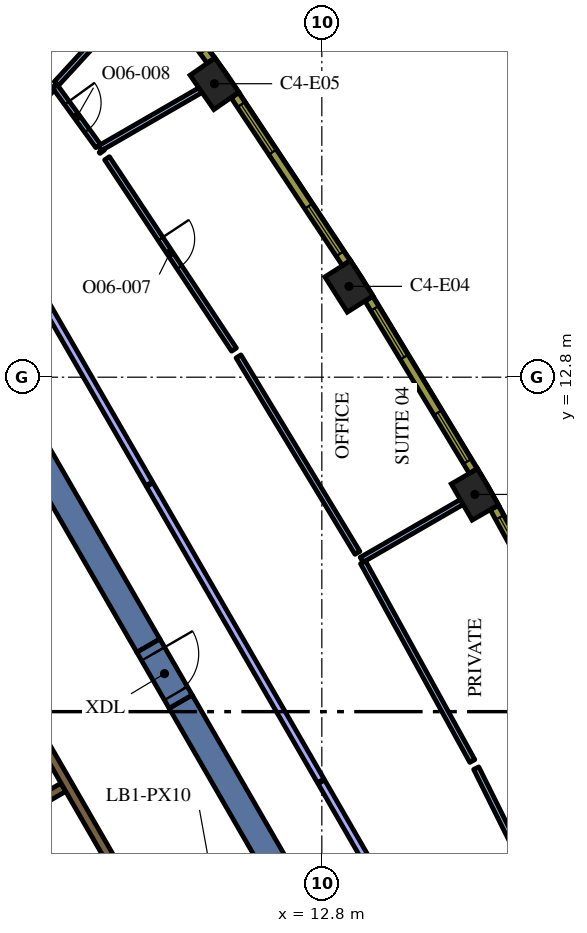
"""IFC4 building model, lengths in metres.
Left out: names, types, materials, properties, quantities, classifications, styles, units other than length and angle.
Written with IfcOpenShell. Run it as: python <this file> out.ifc"""

import sys

from ifc_helpers import new_model, si_unit, direction, frame, frame_2d, origin, origin_2d, place, context, subcontext, project, spatial, rectangle, extrude, element, fill, save


model = new_model("IFC4")
c1 = context("Model", 3, precision=1e-05, world=origin(), true_north=direction((0.0, 1.0)))
c2 = subcontext(c1, "Body", "Model", "MODEL_VIEW")
j1 = project(units=[si_unit("LENGTHUNIT", "METRE"), si_unit("PLANEANGLEUNIT", "RADIAN")], contexts=[c1])
p1 = place(None, origin())
s1 = spatial("IfcSite", under=j1, at=p1, CompositionType="ELEMENT")
p2 = place(p1, origin())
s2 = spatial("IfcBuilding", under=s1, at=p2, CompositionType="ELEMENT")
p3 = place(p2, frame((0.0, 0.0, 201.6)))
s3 = spatial("IfcBuildingStorey", under=s2, at=p3, CompositionType="ELEMENT", Elevation=201.6)
for number, where, z_axis, x_axis in (
    (1, (16.827, 9.715, 0.0), (0.0, 0.0, 1.0), (-0.5, 0.866, 0.0)),
    (2, (13.513, 15.19, 0.0), (0.0, 0.0, 1.0), (-0.536, 0.845, 0.0)),
    (3, (9.975, 20.522, 0.0), (0.0, 0.0, 1.0), (-0.57, 0.822, 0.0)),
):
    element("IfcColumn", number, at=place(p3, frame(where, z_axis=z_axis, x_axis=x_axis)), inside=s3, PredefinedType="COLUMN", context=c2, shape_type="SweptSolid", body=[
        extrude(rectangle(XDim=1.1, YDim=0.8, at=origin_2d()), origin(), (0.0, 0.0, 1.0), 4.2),
    ])
for number, where, z_axis, x_axis in (
    (4, (9.085, 4.264, 0.0), (0.0, 0.0, 1.0), (0.5, -0.866, 0.0)),
    (5, (8.235, 5.736, 0.0), (0.0, 0.0, 1.0), (-0.5, 0.866, 0.0)),
):
    element("IfcWall", number, at=place(p3, frame(where, z_axis=z_axis, x_axis=x_axis)), inside=s3, PredefinedType="SOLIDWALL", context=c2, shape_type="SweptSolid", body=[
        extrude(rectangle(XDim=12.472, YDim=0.7, at=frame_2d((6.236, 0.0))), origin(), (0.0, 0.0, 1.0), 4.2),
    ])
p4 = place(p3, frame((5.97, -2.591, 0.0), z_axis=(0.0, 0.0, 1.0), x_axis=(-0.499994469932, 0.866028596547, 0.0)))
e6 = element("IfcWall", 6, at=p4, inside=s3, PredefinedType="SOLIDWALL", context=c2, shape_type="SweptSolid", body=[
    extrude(rectangle(XDim=10.488, YDim=0.25, at=frame_2d((5.244, 0.0))), origin(), (0.0, 0.0, 1.0), 4.2),
])
p5 = place(p3, frame((4.094, 0.909, 0.0), z_axis=(0.0, 0.0, 1.0), x_axis=(0.866008176907, 0.50002983664, 0.0)))
e7 = element("IfcWall", 7, at=p5, inside=s3, PredefinedType="SOLIDWALL", context=c2, shape_type="SweptSolid", body=[
    extrude(rectangle(XDim=2.2, YDim=0.25, at=frame_2d((1.1, 0.0))), origin(), (0.0, 0.0, 1.0), 4.2),
])
p6 = place(p3, frame((8.565, -2.185, 0.0), z_axis=(0.0, 0.0, 1.0), x_axis=(-0.499997954832, 0.866026584559, 0.0)))
e8 = element("IfcWall", 8, at=p6, inside=s3, PredefinedType="SOLIDWALL", context=c2, shape_type="SweptSolid", body=[
    extrude(rectangle(XDim=12.35, YDim=0.25, at=frame_2d((6.175, 0.0))), origin(), (0.0, 0.0, 1.0), 4.2),
])
p7 = place(p6, frame((0.585, 0.0, 0.0)))
e9 = element("IfcOpeningElement", 9, at=p7, cuts=e8, PredefinedType="OPENING", context=c2, shape_type="SweptSolid", body=[
    extrude(rectangle(XDim=1.1, YDim=2.1, at=frame_2d((0.55, 1.05))), frame((0.0, 0.135, 0.0), z_axis=(0.0, -1.0, 0.0), x_axis=(1.0, 0.0, 0.0)), (0.0, 0.0, 1.0), 0.27),
])
p8 = place(p3, frame((8.235, 5.736, 0.0), z_axis=(0.0, 0.0, 1.0), x_axis=(0.499954529098, -0.86605165483, 0.0)))
e10 = element("IfcWall", 10, at=p8, inside=s3, PredefinedType="SOLIDWALL", context=c2, shape_type="SweptSolid", body=[
    extrude(rectangle(XDim=1.7, YDim=0.7, at=frame_2d((0.85, 0.0))), origin(), (0.0, 0.0, 1.0), 4.2),
])
p9 = place(p8, frame((0.25, 0.0, 0.0)))
e11 = element("IfcOpeningElement", 11, at=p9, cuts=e10, PredefinedType="OPENING", context=c2, shape_type="SweptSolid", body=[
    extrude(rectangle(XDim=1.2, YDim=2.1, at=frame_2d((0.6, 1.05))), frame((0.0, 0.36, 0.0), z_axis=(0.0, -1.0, 0.0), x_axis=(1.0, 0.0, 0.0)), (0.0, 0.0, 1.0), 0.72),
])
p10 = place(p3, frame((13.848, 7.995, 0.0), z_axis=(0.0, 0.0, 1.0), x_axis=(0.86603583403, 0.49998193385, 0.0)))
e12 = element("IfcWall", 12, at=p10, inside=s3, PredefinedType="PARTITIONING", context=c2, shape_type="SweptSolid", body=[
    extrude(rectangle(XDim=3.041, YDim=0.15, at=frame_2d((1.52, 0.0))), origin(), (0.0, 0.0, 1.0), 3.45),
])
p11 = place(p3, frame((16.863, 2.513, 0.0), z_axis=(0.0, 0.0, 1.0), x_axis=(0.445159947046, -0.895451071553, 0.0)))
e13 = element("IfcWall", 13, at=p11, inside=s3, PredefinedType="PARTITIONING", context=c2, shape_type="SweptSolid", body=[
    extrude(rectangle(XDim=6.043, YDim=0.15, at=frame_2d((3.021, 0.0))), origin(), (0.0, 0.0, 1.0), 3.45),
])
p12 = place(p11, frame((2.542, 0.0, 0.0)))
e14 = element("IfcOpeningElement", 14, at=p12, cuts=e13, PredefinedType="OPENING", context=c2, shape_type="SweptSolid", body=[
    extrude(rectangle(XDim=0.9, YDim=2.1, at=frame_2d((0.45, 1.05))), frame((0.0, 0.085, 0.0), z_axis=(0.0, -1.0, 0.0), x_axis=(1.0, 0.0, 0.0)), (0.0, 0.0, 1.0), 0.17),
])
p13 = place(p3, frame((16.76, 2.7, 0.0), z_axis=(0.0, 0.0, 1.0), x_axis=(-0.481907755985, 0.876221955169, 0.0)))
e15 = element("IfcWall", 15, at=p13, inside=s3, PredefinedType="PARTITIONING", context=c2, shape_type="SweptSolid", body=[
    extrude(rectangle(XDim=5.967, YDim=0.15, at=frame_2d((2.984, 0.0))), origin(), (0.0, 0.0, 1.0), 3.45),
])
p14 = place(p3, frame((6.958, 18.823, 0.0), z_axis=(0.0, 0.0, 1.0), x_axis=(0.866008752819, 0.500028839209, 0.0)))
e16 = element("IfcWall", 16, at=p14, inside=s3, PredefinedType="PARTITIONING", context=c2, shape_type="SweptSolid", body=[
    extrude(rectangle(XDim=3.058, YDim=0.15, at=frame_2d((1.529, 0.0))), origin(), (0.0, 0.0, 1.0), 3.45),
])
p15 = place(p3, frame((13.737, 8.178, 0.0), z_axis=(0.0, 0.0, 1.0), x_axis=(-0.517884383874, 0.855450620983, 0.0)))
e17 = element("IfcWall", 17, at=p15, inside=s3, PredefinedType="PARTITIONING", context=c2, shape_type="SweptSolid", body=[
    extrude(rectangle(XDim=6.043, YDim=0.15, at=frame_2d((3.021, 0.0))), origin(), (0.0, 0.0, 1.0), 3.45),
])
p16 = place(p3, frame((7.148, 18.561, 0.0), z_axis=(0.0, 0.0, 1.0), x_axis=(0.552890023891, -0.833254235802, 0.0)))
e18 = element("IfcWall", 18, at=p16, inside=s3, PredefinedType="PARTITIONING", context=c2, shape_type="SweptSolid", body=[
    extrude(rectangle(XDim=6.042, YDim=0.15, at=frame_2d((3.021, 0.0))), origin(), (0.0, 0.0, 1.0), 3.45),
])
p17 = place(p16, frame((2.542, 0.0, 0.0)))
e19 = element("IfcOpeningElement", 19, at=p17, cuts=e18, PredefinedType="OPENING", context=c2, shape_type="SweptSolid", body=[
    extrude(rectangle(XDim=0.9, YDim=2.1, at=frame_2d((0.45, 1.05))), frame((0.0, 0.085, 0.0), z_axis=(0.0, -1.0, 0.0), x_axis=(1.0, 0.0, 0.0)), (0.0, 0.0, 1.0), 0.17),
])
p18 = place(p3, frame((7.022, 18.734, 0.0), z_axis=(0.0, 0.0, 1.0), x_axis=(-0.585233084123, 0.810865116556, 0.0)))
e20 = element("IfcWall", 20, at=p18, inside=s3, PredefinedType="PARTITIONING", context=c2, shape_type="SweptSolid", body=[
    extrude(rectangle(XDim=0.035, YDim=0.15, at=frame_2d((0.017, 0.0))), origin(), (0.0, 0.0, 1.0), 3.45),
])
p19 = place(p3, frame((5.764, 20.469, 0.0), z_axis=(0.0, 0.0, 1.0), x_axis=(0.586969615341, -0.809608961577, 0.0)))
e21 = element("IfcWall", 21, at=p19, inside=s3, PredefinedType="PARTITIONING", context=c2, shape_type="SweptSolid", body=[
    extrude(rectangle(XDim=1.957, YDim=0.15, at=frame_2d((0.979, 0.0))), origin(), (0.0, 0.0, 1.0), 3.45),
])
p20 = place(p19, frame((0.558, 0.0, 0.0)))
e22 = element("IfcOpeningElement", 22, at=p20, cuts=e21, PredefinedType="OPENING", context=c2, shape_type="SweptSolid", body=[
    extrude(rectangle(XDim=0.9, YDim=2.1, at=frame_2d((0.45, 1.05))), frame((0.0, 0.085, 0.0), z_axis=(0.0, -1.0, 0.0), x_axis=(1.0, 0.0, 0.0)), (0.0, 0.0, 1.0), 0.17),
])
p21 = place(p3, frame((5.816, 20.526, 0.0), z_axis=(0.0, 0.0, 1.0), x_axis=(0.675700046709, 0.737176672771, 0.0)))
e23 = element("IfcWall", 23, at=p21, inside=s3, PredefinedType="PARTITIONING", context=c2, shape_type="SweptSolid", body=[
    extrude(rectangle(XDim=3.598, YDim=0.15, at=frame_2d((1.799, 0.0))), origin(), (0.0, 0.0, 1.0), 3.45),
])
p22 = place(p3, frame((3.585, 18.091, 0.0), z_axis=(0.0, 0.0, 1.0), x_axis=(0.675657922277, 0.737215282034, 0.0)))
e24 = element("IfcWall", 24, at=p22, inside=s3, PredefinedType="PARTITIONING", context=c2, shape_type="SweptSolid", body=[
    extrude(rectangle(XDim=3.149, YDim=0.15, at=frame_2d((1.575, 0.0))), origin(), (0.0, 0.0, 1.0), 3.45),
])
p23 = place(p22, frame((1.0, 0.0, 0.0)))
e25 = element("IfcOpeningElement", 25, at=p23, cuts=e24, PredefinedType="OPENING", context=c2, shape_type="SweptSolid", body=[
    extrude(rectangle(XDim=0.9, YDim=2.1, at=frame_2d((0.45, 1.05))), frame((0.0, 0.085, 0.0), z_axis=(0.0, -1.0, 0.0), x_axis=(1.0, 0.0, 0.0)), (0.0, 0.0, 1.0), 0.17),
])
p24 = place(p3, frame((12.772, 2.178, 0.0), z_axis=(0.0, 0.0, 1.0), x_axis=(-0.5000018851, 0.866024315419, 0.0)))
e26 = element("IfcWall", 26, at=p24, inside=s3, PredefinedType="PARTITIONING", context=c2, shape_type="SweptSolid", body=[
    extrude(rectangle(XDim=9.0, YDim=0.2, at=frame_2d((4.5, 0.0))), origin(), (0.0, 0.0, 1.0), 3.45),
])
p25 = place(p3, frame((8.257, 9.998, 0.0), z_axis=(0.0, 0.0, 1.0), x_axis=(-0.499998405424, 0.866026324412, 0.0)))
e27 = element("IfcWall", 27, at=p25, inside=s3, PredefinedType="PARTITIONING", context=c2, shape_type="SweptSolid", body=[
    extrude(rectangle(XDim=9.267, YDim=0.2, at=frame_2d((4.633, 0.0))), origin(), (0.0, 0.0, 1.0), 3.45),
])
p26 = place(p3, frame((17.681, -6.324, 0.0), z_axis=(0.0, 0.0, 1.0), x_axis=(-0.500021153861, 0.866013190252, 0.0)))
e28 = element("IfcWall", 28, at=p26, inside=s3, PredefinedType="PARTITIONING", context=c2, shape_type="SweptSolid", body=[
    extrude(rectangle(XDim=9.787, YDim=0.2, at=frame_2d((4.894, 0.0))), origin(), (0.0, 0.0, 1.0), 3.45),
])
p27 = place(p26, frame((4.4, 0.0, 0.0)))
e29 = element("IfcOpeningElement", 29, at=p27, cuts=e28, PredefinedType="OPENING", context=c2, shape_type="SweptSolid", body=[
    extrude(rectangle(XDim=1.0, YDim=2.1, at=frame_2d((0.5, 1.05))), frame((0.0, 0.11, 0.0), z_axis=(0.0, -1.0, 0.0), x_axis=(1.0, 0.0, 0.0)), (0.0, 0.0, 1.0), 0.22),
])
p28 = place(p3, frame((19.892, 4.725, 0.0), z_axis=(0.0, 0.0, 1.0), x_axis=(-0.481925825015, 0.876212017256, 0.0)))
e30 = element("IfcWall", 30, at=p28, inside=s3, PredefinedType="SOLIDWALL", context=c2, shape_type="SweptSolid", body=[
    extrude(rectangle(XDim=5.299, YDim=0.24, at=frame_2d((2.649, 0.0))), origin(), (0.0, 0.0, 1.0), 3.95),
])
p29 = place(p28, frame((0.295, 0.0, 0.9)))
e31 = element("IfcOpeningElement", 31, at=p29, cuts=e30, PredefinedType="OPENING", context=c2, shape_type="SweptSolid", body=[
    extrude(rectangle(XDim=1.5, YDim=2.55, at=frame_2d((0.75, 1.275))), frame((0.0, 0.13, 0.0), z_axis=(0.0, -1.0, 0.0), x_axis=(1.0, 0.0, 0.0)), (0.0, 0.0, 1.0), 0.26),
])
p30 = place(p28, frame((3.504, 0.0, 0.9)))
e32 = element("IfcOpeningElement", 32, at=p30, cuts=e30, PredefinedType="OPENING", context=c2, shape_type="SweptSolid", body=[
    extrude(rectangle(XDim=1.5, YDim=2.55, at=frame_2d((0.75, 1.275))), frame((0.0, 0.13, 0.0), z_axis=(0.0, -1.0, 0.0), x_axis=(1.0, 0.0, 0.0)), (0.0, 0.0, 1.0), 0.26),
])
p31 = place(p3, frame((16.782, 10.331, 0.0), z_axis=(0.0, 0.0, 1.0), x_axis=(-0.517846166225, 0.855473756538, 0.0)))
e33 = element("IfcWall", 33, at=p31, inside=s3, PredefinedType="SOLIDWALL", context=c2, shape_type="SweptSolid", body=[
    extrude(rectangle(XDim=5.298, YDim=0.24, at=frame_2d((2.649, 0.0))), origin(), (0.0, 0.0, 1.0), 3.95),
])
p32 = place(p31, frame((0.294, 0.0, 0.9)))
e34 = element("IfcOpeningElement", 34, at=p32, cuts=e33, PredefinedType="OPENING", context=c2, shape_type="SweptSolid", body=[
    extrude(rectangle(XDim=1.5, YDim=2.55, at=frame_2d((0.75, 1.275))), frame((0.0, 0.13, 0.0), z_axis=(0.0, -1.0, 0.0), x_axis=(1.0, 0.0, 0.0)), (0.0, 0.0, 1.0), 0.26),
])
p33 = place(p31, frame((3.504, 0.0, 0.9)))
e35 = element("IfcOpeningElement", 35, at=p33, cuts=e33, PredefinedType="OPENING", context=c2, shape_type="SweptSolid", body=[
    extrude(rectangle(XDim=1.5, YDim=2.55, at=frame_2d((0.75, 1.275))), frame((0.0, 0.13, 0.0), z_axis=(0.0, -1.0, 0.0), x_axis=(1.0, 0.0, 0.0)), (0.0, 0.0, 1.0), 0.26),
])
p34 = place(p3, frame((13.442, 15.803, 0.0), z_axis=(0.0, 0.0, 1.0), x_axis=(-0.552901821755, 0.833246407433, 0.0)))
e36 = element("IfcWall", 36, at=p34, inside=s3, PredefinedType="SOLIDWALL", context=c2, shape_type="SweptSolid", body=[
    extrude(rectangle(XDim=5.298, YDim=0.24, at=frame_2d((2.649, 0.0))), origin(), (0.0, 0.0, 1.0), 3.95),
])
p35 = place(p34, frame((0.295, 0.0, 0.9)))
e37 = element("IfcOpeningElement", 37, at=p35, cuts=e36, PredefinedType="OPENING", context=c2, shape_type="SweptSolid", body=[
    extrude(rectangle(XDim=1.5, YDim=2.55, at=frame_2d((0.75, 1.275))), frame((0.0, 0.13, 0.0), z_axis=(0.0, -1.0, 0.0), x_axis=(1.0, 0.0, 0.0)), (0.0, 0.0, 1.0), 0.26),
])
p36 = place(p34, frame((3.504, 0.0, 0.9)))
e38 = element("IfcOpeningElement", 38, at=p36, cuts=e36, PredefinedType="OPENING", context=c2, shape_type="SweptSolid", body=[
    extrude(rectangle(XDim=1.5, YDim=2.55, at=frame_2d((0.75, 1.275))), frame((0.0, 0.13, 0.0), z_axis=(0.0, -1.0, 0.0), x_axis=(1.0, 0.0, 0.0)), (0.0, 0.0, 1.0), 0.26),
])
p37 = place(p3, frame((9.878, 21.132, 0.0), z_axis=(0.0, 0.0, 1.0), x_axis=(-0.586998456641, 0.80958805074, 0.0)))
e39 = element("IfcWall", 39, at=p37, inside=s3, PredefinedType="SOLIDWALL", context=c2, shape_type="SweptSolid", body=[
    extrude(rectangle(XDim=5.311, YDim=0.24, at=frame_2d((2.655, 0.0))), origin(), (0.0, 0.0, 1.0), 3.95),
])
p38 = place(p37, frame((0.306, 0.0, 0.9)))
e40 = element("IfcOpeningElement", 40, at=p38, cuts=e39, PredefinedType="OPENING", context=c2, shape_type="SweptSolid", body=[
    extrude(rectangle(XDim=1.5, YDim=2.55, at=frame_2d((0.75, 1.275))), frame((0.0, 0.13, 0.0), z_axis=(0.0, -1.0, 0.0), x_axis=(1.0, 0.0, 0.0)), (0.0, 0.0, 1.0), 0.26),
])
p39 = place(p37, frame((3.539, 0.0, 0.9)))
e41 = element("IfcOpeningElement", 41, at=p39, cuts=e39, PredefinedType="OPENING", context=c2, shape_type="SweptSolid", body=[
    extrude(rectangle(XDim=1.5, YDim=2.55, at=frame_2d((0.75, 1.275))), frame((0.0, 0.13, 0.0), z_axis=(0.0, -1.0, 0.0), x_axis=(1.0, 0.0, 0.0)), (0.0, 0.0, 1.0), 0.26),
])
p40 = place(p9, origin())
e42 = element("IfcDoor", 42, at=p40, inside=s3, OperationType="SINGLE_SWING_LEFT", PredefinedType="DOOR", context=c2, shape_type="SweptSolid", body=[
    extrude(rectangle(XDim=1.2, YDim=2.1, at=frame_2d((0.6, 1.05))), frame((0.0, 0.025, 0.0), z_axis=(0.0, -1.0, 0.0), x_axis=(1.0, 0.0, 0.0)), (0.0, 0.0, 1.0), 0.05),
])
fill(e11, e42)
p41 = place(p17, origin())
e43 = element("IfcDoor", 43, at=p41, inside=s3, OperationType="SINGLE_SWING_LEFT", PredefinedType="DOOR", context=c2, shape_type="SweptSolid", body=[
    extrude(rectangle(XDim=0.9, YDim=2.1, at=frame_2d((0.45, 1.05))), frame((0.0, 0.025, 0.0), z_axis=(0.0, -1.0, 0.0), x_axis=(1.0, 0.0, 0.0)), (0.0, 0.0, 1.0), 0.05),
])
fill(e19, e43)
p42 = place(p20, origin())
e44 = element("IfcDoor", 44, at=p42, inside=s3, OperationType="SINGLE_SWING_RIGHT", PredefinedType="DOOR", context=c2, shape_type="SweptSolid", body=[
    extrude(rectangle(XDim=0.9, YDim=2.1, at=frame_2d((0.45, 1.05))), frame((0.0, 0.025, 0.0), z_axis=(0.0, -1.0, 0.0), x_axis=(1.0, 0.0, 0.0)), (0.0, 0.0, 1.0), 0.05),
])
fill(e22, e44)
p43 = place(p30, origin())
e45 = element("IfcWindow", 45, at=p43, inside=s3, PartitioningType="SINGLE_PANEL", PredefinedType="WINDOW", context=c2, shape_type="SweptSolid", body=[
    extrude(rectangle(XDim=1.5, YDim=2.55, at=frame_2d((0.75, 1.275))), frame((0.0, 0.04, 0.0), z_axis=(0.0, -1.0, 0.0), x_axis=(1.0, 0.0, 0.0)), (0.0, 0.0, 1.0), 0.06),
])
fill(e32, e45)
p44 = place(p32, origin())
e46 = element("IfcWindow", 46, at=p44, inside=s3, PartitioningType="SINGLE_PANEL", PredefinedType="WINDOW", context=c2, shape_type="SweptSolid", body=[
    extrude(rectangle(XDim=1.5, YDim=2.55, at=frame_2d((0.75, 1.275))), frame((0.0, 0.04, 0.0), z_axis=(0.0, -1.0, 0.0), x_axis=(1.0, 0.0, 0.0)), (0.0, 0.0, 1.0), 0.06),
])
fill(e34, e46)
p45 = place(p33, origin())
e47 = element("IfcWindow", 47, at=p45, inside=s3, PartitioningType="SINGLE_PANEL", PredefinedType="WINDOW", context=c2, shape_type="SweptSolid", body=[
    extrude(rectangle(XDim=1.5, YDim=2.55, at=frame_2d((0.75, 1.275))), frame((0.0, 0.04, 0.0), z_axis=(0.0, -1.0, 0.0), x_axis=(1.0, 0.0, 0.0)), (0.0, 0.0, 1.0), 0.06),
])
fill(e35, e47)
p46 = place(p35, origin())
e48 = element("IfcWindow", 48, at=p46, inside=s3, PartitioningType="SINGLE_PANEL", PredefinedType="WINDOW", context=c2, shape_type="SweptSolid", body=[
    extrude(rectangle(XDim=1.5, YDim=2.55, at=frame_2d((0.75, 1.275))), frame((0.0, 0.04, 0.0), z_axis=(0.0, -1.0, 0.0), x_axis=(1.0, 0.0, 0.0)), (0.0, 0.0, 1.0), 0.06),
])
fill(e37, e48)
p47 = place(p36, origin())
e49 = element("IfcWindow", 49, at=p47, inside=s3, PartitioningType="SINGLE_PANEL", PredefinedType="WINDOW", context=c2, shape_type="SweptSolid", body=[
    extrude(rectangle(XDim=1.5, YDim=2.55, at=frame_2d((0.75, 1.275))), frame((0.0, 0.04, 0.0), z_axis=(0.0, -1.0, 0.0), x_axis=(1.0, 0.0, 0.0)), (0.0, 0.0, 1.0), 0.06),
])
fill(e38, e49)
save(model, sys.argv[1])
